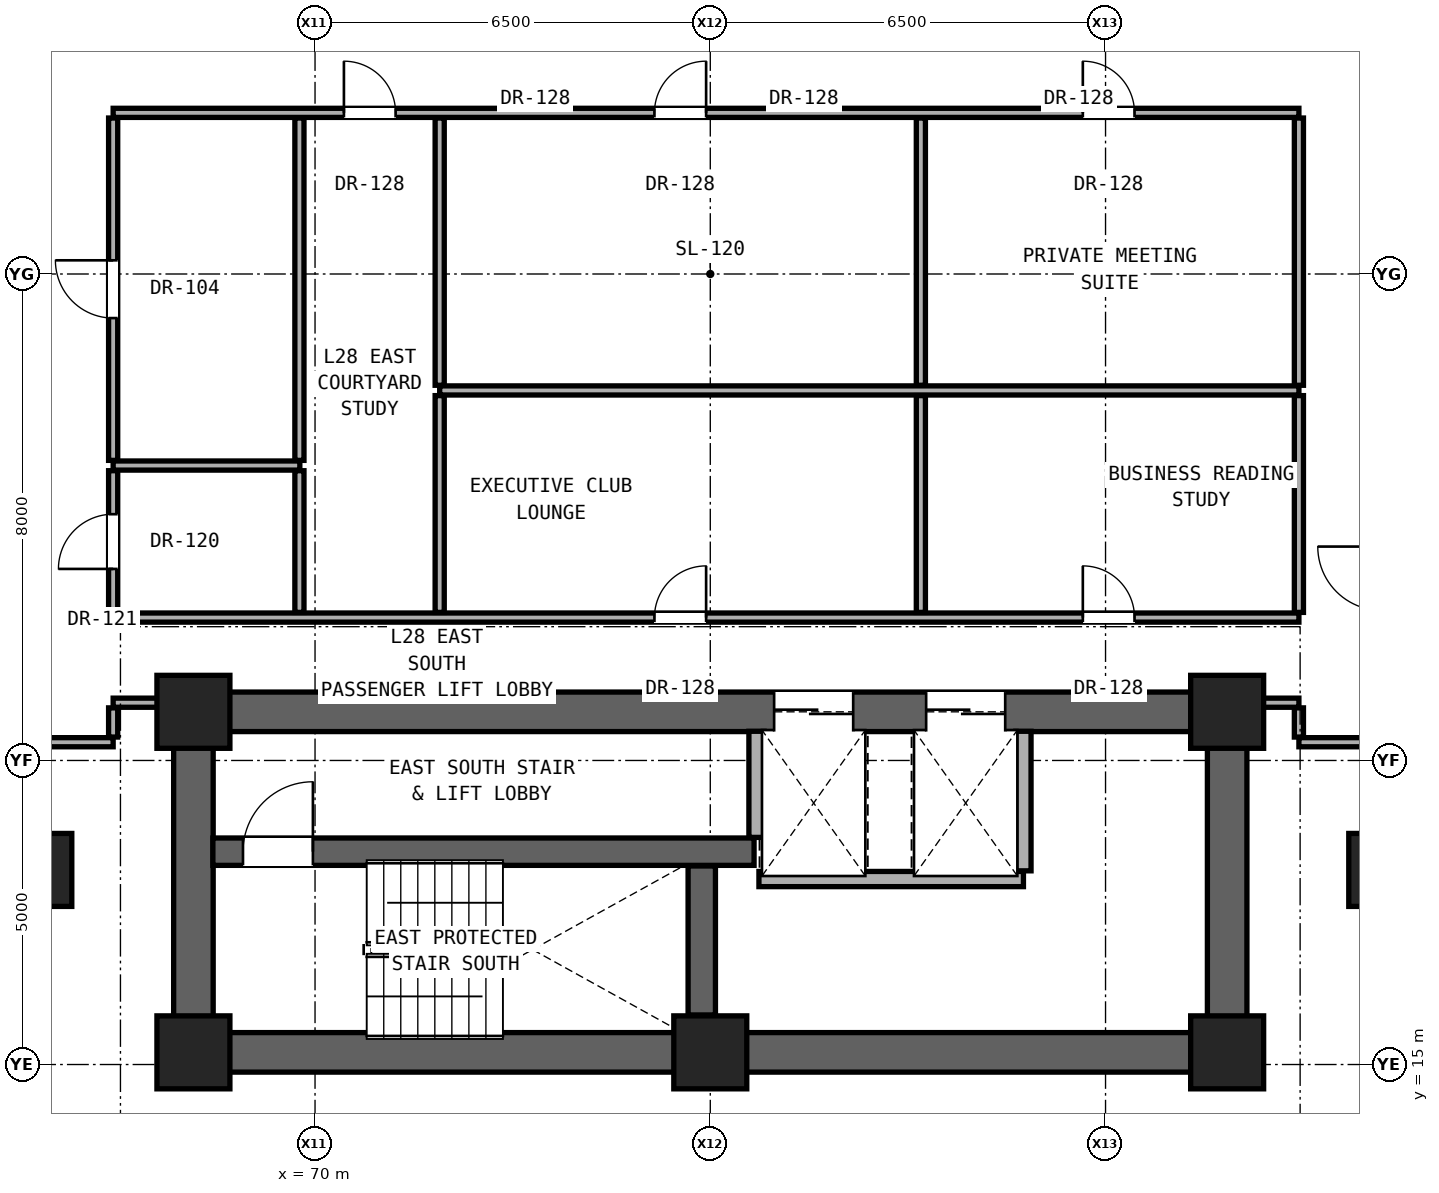
"""IFC4 building model, lengths in metres.
Left out: names, types, materials, properties, quantities, classifications, styles, units other than length and angle.
Written with IfcOpenShell. Run it as: python <this file> out.ifc"""

import sys

from ifc_helpers import new_model, si_unit, direction, frame, frame_2d, origin, origin_2d, place, context, subcontext, project, spatial, rectangle, extrude, element, fill, save


model = new_model("IFC4")
c1 = context("Model", 3, precision=1e-05, world=origin(), true_north=direction((0.0, 1.0)))
c2 = subcontext(c1, "Body", "Model", "MODEL_VIEW")
j1 = project(units=[si_unit("LENGTHUNIT", "METRE"), si_unit("PLANEANGLEUNIT", "RADIAN")], contexts=[c1])
p1 = place(None, origin())
s1 = spatial("IfcSite", under=j1, at=p1, CompositionType="ELEMENT")
p2 = place(p1, origin())
s2 = spatial("IfcBuilding", under=s1, at=p2, CompositionType="ELEMENT")
p3 = place(p2, frame((0.0, 0.0, 101.6)))
s3 = spatial("IfcBuildingStorey", under=s2, at=p3, CompositionType="ELEMENT", Elevation=101.6)
for number, where, z_axis, x_axis in (
    (1, (68.0, 15.2, 0.0), (0.0, 0.0, 1.0), (1.0, 0.0, 0.0)),
    (2, (76.5, 15.2, 0.0), (0.0, 0.0, 1.0), (1.0, 0.0, 0.0)),
    (3, (85.0, 15.2, 0.0), (0.0, 0.0, 1.0), (1.0, 0.0, 0.0)),
    (4, (68.0, 20.8, 0.0), (0.0, 0.0, 1.0), (1.0, 0.0, 0.0)),
    (5, (85.0, 20.8, 0.0), (0.0, 0.0, 1.0), (1.0, 0.0, 0.0)),
):
    element("IfcColumn", number, at=place(p3, frame(where, z_axis=z_axis, x_axis=x_axis)), inside=s3, PredefinedType="COLUMN", context=c2, shape_type="SweptSolid", body=[
        extrude(rectangle(XDim=1.2, YDim=1.2, at=origin_2d()), origin(), (0.0, 0.0, 1.0), 3.3),
    ])
for number, where, z_axis, x_axis in (
    (6, (65.6, 18.2, 0.0), (0.0, 0.0, 1.0), (1.0, 0.0, 0.0)),
    (7, (87.4, 18.2, 0.0), (0.0, 0.0, 1.0), (1.0, 0.0, 0.0)),
):
    element("IfcColumn", number, at=place(p3, frame(where, z_axis=z_axis, x_axis=x_axis)), inside=s3, PredefinedType="PILASTER", context=c2, shape_type="SweptSolid", body=[
        extrude(rectangle(XDim=0.8, YDim=1.2, at=origin_2d()), origin(), (0.0, 0.0, 1.0), 3.3),
    ])
p4 = place(p3, frame((68.0, 15.2, 0.0), z_axis=(0.0, 0.0, 1.0), x_axis=(1.0, 0.0, 0.0)))
e8 = element("IfcWall", 8, at=p4, inside=s3, PredefinedType="SHEAR", context=c2, shape_type="SweptSolid", body=[
    extrude(rectangle(XDim=17.0, YDim=0.65, at=frame_2d((8.5, 0.0))), origin(), (0.0, 0.0, 1.0), 3.08),
])
for number, where, z_axis, x_axis in (
    (9, (68.0, 15.2, 0.0), (0.0, 0.0, 1.0), (0.0, 1.0, 0.0)),
    (10, (85.0, 15.2, 0.0), (0.0, 0.0, 1.0), (0.0, 1.0, 0.0)),
):
    element("IfcWall", number, at=place(p3, frame(where, z_axis=z_axis, x_axis=x_axis)), inside=s3, PredefinedType="SHEAR", context=c2, shape_type="SweptSolid", body=[
        extrude(rectangle(XDim=5.6, YDim=0.65, at=frame_2d((2.8, 0.0))), origin(), (0.0, 0.0, 1.0), 3.08),
    ])
p5 = place(p3, frame((68.0, 20.8, 0.0), z_axis=(0.0, 0.0, 1.0), x_axis=(1.0, 0.0, 0.0)))
e11 = element("IfcWall", 11, at=p5, inside=s3, PredefinedType="SHEAR", context=c2, shape_type="SweptSolid", body=[
    extrude(rectangle(XDim=17.0, YDim=0.65, at=frame_2d((8.5, 0.0))), origin(), (0.0, 0.0, 1.0), 3.08),
])
p6 = place(p5, frame((9.55, 0.0, 0.0)))
e12 = element("IfcOpeningElement", 12, at=p6, cuts=e11, PredefinedType="OPENING", context=c2, shape_type="SweptSolid", body=[
    extrude(rectangle(XDim=1.3, YDim=2.3, at=frame_2d((0.65, 1.15))), frame((0.0, 0.335, 0.0), z_axis=(0.0, -1.0, 0.0), x_axis=(1.0, 0.0, 0.0)), (0.0, 0.0, 1.0), 0.67),
])
p7 = place(p5, frame((12.05, 0.0, 0.0)))
e13 = element("IfcOpeningElement", 13, at=p7, cuts=e11, PredefinedType="OPENING", context=c2, shape_type="SweptSolid", body=[
    extrude(rectangle(XDim=1.3, YDim=2.3, at=frame_2d((0.65, 1.15))), frame((0.0, 0.335, 0.0), z_axis=(0.0, -1.0, 0.0), x_axis=(1.0, 0.0, 0.0)), (0.0, 0.0, 1.0), 0.67),
])
p8 = place(p3, frame((77.3, 18.05, 0.0), z_axis=(0.0, 0.0, 1.0), x_axis=(1.0, 0.0, 0.0)))
e14 = element("IfcWall", 14, at=p8, inside=s3, PredefinedType="SOLIDWALL", context=c2, shape_type="SweptSolid", body=[
    extrude(rectangle(XDim=4.35, YDim=0.25, at=frame_2d((2.175, 0.0))), origin(), (0.0, 0.0, 1.0), 3.08),
])
p9 = place(p3, frame((68.32, 18.5, 0.0), z_axis=(0.0, 0.0, 1.0), x_axis=(1.0, 0.0, 0.0)))
e15 = element("IfcWall", 15, at=p9, inside=s3, PredefinedType="SHEAR", context=c2, shape_type="SweptSolid", body=[
    extrude(rectangle(XDim=8.9, YDim=0.45, at=frame_2d((4.45, 0.0))), origin(), (0.0, 0.0, 1.0), 3.08),
])
p10 = place(p9, frame((0.495, 0.0, 0.0)))
e16 = element("IfcOpeningElement", 16, at=p10, cuts=e15, PredefinedType="OPENING", context=c2, shape_type="SweptSolid", body=[
    extrude(rectangle(XDim=1.15, YDim=2.2, at=frame_2d((0.575, 1.1))), frame((0.0, 0.235, 0.0), z_axis=(0.0, -1.0, 0.0), x_axis=(1.0, 0.0, 0.0)), (0.0, 0.0, 1.0), 0.47),
])
p11 = place(p3, frame((65.32, 20.3, 0.0), z_axis=(0.0, 0.0, 1.0), x_axis=(1.0, 0.0, 0.0)))
e17 = element("IfcWall", 17, at=p11, inside=s3, PredefinedType="PARTITIONING", context=c2, shape_type="SweptSolid", body=[
    extrude(rectangle(XDim=1.36, YDim=0.15, at=frame_2d((0.68, 0.0))), origin(), (0.0, 0.0, 1.0), 3.08),
])
p12 = place(p3, frame((86.18, 20.3, 0.0), z_axis=(0.0, 0.0, 1.0), x_axis=(1.0, 0.0, 0.0)))
e18 = element("IfcWall", 18, at=p12, inside=s3, PredefinedType="PARTITIONING", context=c2, shape_type="SweptSolid", body=[
    extrude(rectangle(XDim=1.36, YDim=0.15, at=frame_2d((0.68, 0.0))), origin(), (0.0, 0.0, 1.0), 3.08),
])
p13 = place(p3, frame((66.68, 20.95, 0.0), z_axis=(0.0, 0.0, 1.0), x_axis=(1.0, 0.0, 0.0)))
e19 = element("IfcWall", 19, at=p13, inside=s3, PredefinedType="PARTITIONING", context=c2, shape_type="SweptSolid", body=[
    extrude(rectangle(XDim=1.0, YDim=0.15, at=frame_2d((0.5, 0.0))), origin(), (0.0, 0.0, 1.0), 2.472),
])
p14 = place(p3, frame((85.32, 20.95, 0.0), z_axis=(0.0, 0.0, 1.0), x_axis=(1.0, 0.0, 0.0)))
e20 = element("IfcWall", 20, at=p14, inside=s3, PredefinedType="PARTITIONING", context=c2, shape_type="SweptSolid", body=[
    extrude(rectangle(XDim=0.86, YDim=0.15, at=frame_2d((0.43, 0.0))), origin(), (0.0, 0.0, 1.0), 2.472),
])
p15 = place(p3, frame((66.68, 22.35, 0.0), z_axis=(0.0, 0.0, 1.0), x_axis=(1.0, 0.0, 0.0)))
e21 = element("IfcWall", 21, at=p15, inside=s3, PredefinedType="PARTITIONING", context=c2, shape_type="SweptSolid", body=[
    extrude(rectangle(XDim=19.5, YDim=0.15, at=frame_2d((9.75, 0.0))), origin(), (0.0, 0.0, 1.0), 2.145),
])
p16 = place(p15, frame((8.902, 0.0, 0.0)))
e22 = element("IfcOpeningElement", 22, at=p16, cuts=e21, PredefinedType="OPENING", context=c2, shape_type="SweptSolid", body=[
    extrude(rectangle(XDim=0.85, YDim=2.01, at=frame_2d((0.425, 1.005))), frame((0.0, 0.085, 0.0), z_axis=(0.0, -1.0, 0.0), x_axis=(1.0, 0.0, 0.0)), (0.0, 0.0, 1.0), 0.17),
])
p17 = place(p15, frame((15.947, 0.0, 0.0)))
e23 = element("IfcOpeningElement", 23, at=p17, cuts=e21, PredefinedType="OPENING", context=c2, shape_type="SweptSolid", body=[
    extrude(rectangle(XDim=0.85, YDim=2.01, at=frame_2d((0.425, 1.005))), frame((0.0, 0.085, 0.0), z_axis=(0.0, -1.0, 0.0), x_axis=(1.0, 0.0, 0.0)), (0.0, 0.0, 1.0), 0.17),
])
p18 = place(p3, frame((66.68, 24.85, 0.0), z_axis=(0.0, 0.0, 1.0), x_axis=(1.0, 0.0, 0.0)))
e24 = element("IfcWall", 24, at=p18, inside=s3, PredefinedType="PARTITIONING", context=c2, shape_type="SweptSolid", body=[
    extrude(rectangle(XDim=3.07, YDim=0.15, at=frame_2d((1.535, 0.0))), origin(), (0.0, 0.0, 1.0), 2.145),
])
p19 = place(p3, frame((72.05, 26.085, 0.0), z_axis=(0.0, 0.0, 1.0), x_axis=(1.0, 0.0, 0.0)))
e25 = element("IfcWall", 25, at=p19, inside=s3, PredefinedType="PARTITIONING", context=c2, shape_type="SweptSolid", body=[
    extrude(rectangle(XDim=14.13, YDim=0.15, at=frame_2d((7.065, 0.0))), origin(), (0.0, 0.0, 1.0), 2.145),
])
p20 = place(p3, frame((66.68, 30.65, 0.0), z_axis=(0.0, 0.0, 1.0), x_axis=(1.0, 0.0, 0.0)))
e26 = element("IfcWall", 26, at=p20, inside=s3, PredefinedType="PARTITIONING", context=c2, shape_type="SweptSolid", body=[
    extrude(rectangle(XDim=19.5, YDim=0.15, at=frame_2d((9.75, 0.0))), origin(), (0.0, 0.0, 1.0), 2.145),
])
p21 = place(p20, frame((3.795, 0.0, 0.0)))
e27 = element("IfcOpeningElement", 27, at=p21, cuts=e26, PredefinedType="OPENING", context=c2, shape_type="SweptSolid", body=[
    extrude(rectangle(XDim=0.85, YDim=2.01, at=frame_2d((0.425, 1.005))), frame((0.0, 0.085, 0.0), z_axis=(0.0, -1.0, 0.0), x_axis=(1.0, 0.0, 0.0)), (0.0, 0.0, 1.0), 0.17),
])
p22 = place(p20, frame((8.902, 0.0, 0.0)))
e28 = element("IfcOpeningElement", 28, at=p22, cuts=e26, PredefinedType="OPENING", context=c2, shape_type="SweptSolid", body=[
    extrude(rectangle(XDim=0.85, YDim=2.01, at=frame_2d((0.425, 1.005))), frame((0.0, 0.085, 0.0), z_axis=(0.0, -1.0, 0.0), x_axis=(1.0, 0.0, 0.0)), (0.0, 0.0, 1.0), 0.17),
])
p23 = place(p20, frame((15.947, 0.0, 0.0)))
e29 = element("IfcOpeningElement", 29, at=p23, cuts=e26, PredefinedType="OPENING", context=c2, shape_type="SweptSolid", body=[
    extrude(rectangle(XDim=0.85, YDim=2.01, at=frame_2d((0.425, 1.005))), frame((0.0, 0.085, 0.0), z_axis=(0.0, -1.0, 0.0), x_axis=(1.0, 0.0, 0.0)), (0.0, 0.0, 1.0), 0.17),
])
p24 = place(p3, frame((66.68, 20.385, 0.0), z_axis=(0.0, 0.0, 1.0), x_axis=(0.0, 1.0, 0.0)))
e30 = element("IfcWall", 30, at=p24, inside=s3, PredefinedType="PARTITIONING", context=c2, shape_type="SweptSolid", body=[
    extrude(rectangle(XDim=0.48, YDim=0.15, at=frame_2d((0.24, 0.0))), origin(), (0.0, 0.0, 1.0), 2.472),
])
p25 = place(p3, frame((66.68, 22.435, 0.0), z_axis=(0.0, 0.0, 1.0), x_axis=(0.0, 1.0, 0.0)))
e31 = element("IfcWall", 31, at=p25, inside=s3, PredefinedType="PARTITIONING", context=c2, shape_type="SweptSolid", body=[
    extrude(rectangle(XDim=2.33, YDim=0.15, at=frame_2d((1.165, 0.0))), origin(), (0.0, 0.0, 1.0), 3.08),
])
p26 = place(p25, frame((0.715, 0.0, 0.0)))
e32 = element("IfcOpeningElement", 32, at=p26, cuts=e31, PredefinedType="OPENING", context=c2, shape_type="SweptSolid", body=[
    extrude(rectangle(XDim=0.9, YDim=2.1, at=frame_2d((0.45, 1.05))), frame((0.0, 0.085, 0.0), z_axis=(0.0, -1.0, 0.0), x_axis=(1.0, 0.0, 0.0)), (0.0, 0.0, 1.0), 0.17),
])
p27 = place(p3, frame((66.68, 24.935, 0.0), z_axis=(0.0, 0.0, 1.0), x_axis=(0.0, 1.0, 0.0)))
e33 = element("IfcWall", 33, at=p27, inside=s3, PredefinedType="PARTITIONING", context=c2, shape_type="SweptSolid", body=[
    extrude(rectangle(XDim=5.63, YDim=0.15, at=frame_2d((2.815, 0.0))), origin(), (0.0, 0.0, 1.0), 2.299),
])
p28 = place(p27, frame((2.34, 0.0, 0.0)))
e34 = element("IfcOpeningElement", 34, at=p28, cuts=e33, PredefinedType="OPENING", context=c2, shape_type="SweptSolid", body=[
    extrude(rectangle(XDim=0.95, YDim=2.15, at=frame_2d((0.475, 1.075))), frame((0.0, 0.085, 0.0), z_axis=(0.0, -1.0, 0.0), x_axis=(1.0, 0.0, 0.0)), (0.0, 0.0, 1.0), 0.17),
])
p29 = place(p3, frame((69.743, 22.435, 0.0), z_axis=(0.0, 0.0, 1.0), x_axis=(0.0, 1.0, 0.0)))
e35 = element("IfcWall", 35, at=p29, inside=s3, PredefinedType="PARTITIONING", context=c2, shape_type="SweptSolid", body=[
    extrude(rectangle(XDim=2.33, YDim=0.15, at=frame_2d((1.165, 0.0))), origin(), (0.0, 0.0, 1.0), 3.08),
])
p30 = place(p3, frame((69.743, 24.935, 0.0), z_axis=(0.0, 0.0, 1.0), x_axis=(0.0, 1.0, 0.0)))
e36 = element("IfcWall", 36, at=p30, inside=s3, PredefinedType="PARTITIONING", context=c2, shape_type="SweptSolid", body=[
    extrude(rectangle(XDim=5.63, YDim=0.15, at=frame_2d((2.815, 0.0))), origin(), (0.0, 0.0, 1.0), 2.145),
])
p31 = place(p3, frame((72.05, 22.435, 0.0), z_axis=(0.0, 0.0, 1.0), x_axis=(0.0, 1.0, 0.0)))
e37 = element("IfcWall", 37, at=p31, inside=s3, PredefinedType="PARTITIONING", context=c2, shape_type="SweptSolid", body=[
    extrude(rectangle(XDim=3.565, YDim=0.15, at=frame_2d((1.782, 0.0))), origin(), (0.0, 0.0, 1.0), 2.609),
])
p32 = place(p3, frame((72.05, 26.17, 0.0), z_axis=(0.0, 0.0, 1.0), x_axis=(0.0, 1.0, 0.0)))
e38 = element("IfcWall", 38, at=p32, inside=s3, PredefinedType="PARTITIONING", context=c2, shape_type="SweptSolid", body=[
    extrude(rectangle(XDim=4.395, YDim=0.15, at=frame_2d((2.198, 0.0))), origin(), (0.0, 0.0, 1.0), 2.145),
])
p33 = place(p3, frame((76.36, 15.815, 0.0), z_axis=(0.0, 0.0, 1.0), x_axis=(0.0, 1.0, 0.0)))
e39 = element("IfcWall", 39, at=p33, inside=s3, PredefinedType="SHEAR", context=c2, shape_type="SweptSolid", body=[
    extrude(rectangle(XDim=2.45, YDim=0.45, at=frame_2d((1.225, 0.0))), origin(), (0.0, 0.0, 1.0), 3.08),
])
p34 = place(p3, frame((77.26, 18.735, 0.0), z_axis=(0.0, 0.0, 1.0), x_axis=(0.0, 1.0, 0.0)))
e40 = element("IfcWall", 40, at=p34, inside=s3, PredefinedType="SOLIDWALL", context=c2, shape_type="SweptSolid", body=[
    extrude(rectangle(XDim=1.745, YDim=0.25, at=frame_2d((0.873, 0.0))), origin(), (0.0, 0.0, 1.0), 3.08),
])
p35 = place(p3, frame((79.963, 22.435, 0.0), z_axis=(0.0, 0.0, 1.0), x_axis=(0.0, 1.0, 0.0)))
e41 = element("IfcWall", 41, at=p35, inside=s3, PredefinedType="PARTITIONING", context=c2, shape_type="SweptSolid", body=[
    extrude(rectangle(XDim=3.565, YDim=0.15, at=frame_2d((1.782, 0.0))), origin(), (0.0, 0.0, 1.0), 3.08),
])
p36 = place(p3, frame((79.963, 26.17, 0.0), z_axis=(0.0, 0.0, 1.0), x_axis=(0.0, 1.0, 0.0)))
e42 = element("IfcWall", 42, at=p36, inside=s3, PredefinedType="PARTITIONING", context=c2, shape_type="SweptSolid", body=[
    extrude(rectangle(XDim=4.395, YDim=0.15, at=frame_2d((2.198, 0.0))), origin(), (0.0, 0.0, 1.0), 2.145),
])
p37 = place(p3, frame((81.65, 18.185, 0.0), z_axis=(0.0, 0.0, 1.0), x_axis=(0.0, 1.0, 0.0)))
e43 = element("IfcWall", 43, at=p37, inside=s3, PredefinedType="SOLIDWALL", context=c2, shape_type="SweptSolid", body=[
    extrude(rectangle(XDim=2.295, YDim=0.25, at=frame_2d((1.147, 0.0))), origin(), (0.0, 0.0, 1.0), 3.08),
])
p38 = place(p3, frame((86.18, 20.385, 0.0), z_axis=(0.0, 0.0, 1.0), x_axis=(0.0, 1.0, 0.0)))
e44 = element("IfcWall", 44, at=p38, inside=s3, PredefinedType="PARTITIONING", context=c2, shape_type="SweptSolid", body=[
    extrude(rectangle(XDim=0.48, YDim=0.15, at=frame_2d((0.24, 0.0))), origin(), (0.0, 0.0, 1.0), 2.472),
])
p39 = place(p3, frame((86.18, 22.435, 0.0), z_axis=(0.0, 0.0, 1.0), x_axis=(0.0, 1.0, 0.0)))
e45 = element("IfcWall", 45, at=p39, inside=s3, PredefinedType="PARTITIONING", context=c2, shape_type="SweptSolid", body=[
    extrude(rectangle(XDim=3.565, YDim=0.15, at=frame_2d((1.782, 0.0))), origin(), (0.0, 0.0, 1.0), 3.08),
])
p40 = place(p3, frame((86.18, 26.17, 0.0), z_axis=(0.0, 0.0, 1.0), x_axis=(0.0, 1.0, 0.0)))
e46 = element("IfcWall", 46, at=p40, inside=s3, PredefinedType="PARTITIONING", context=c2, shape_type="SweptSolid", body=[
    extrude(rectangle(XDim=4.395, YDim=0.15, at=frame_2d((2.198, 0.0))), origin(), (0.0, 0.0, 1.0), 2.299),
])
p41 = place(p10, origin())
e47 = element("IfcDoor", 47, at=p41, inside=s3, OperationType="SINGLE_SWING_RIGHT", PredefinedType="DOOR", context=c2, shape_type="SweptSolid", body=[
    extrude(rectangle(XDim=1.15, YDim=2.2, at=frame_2d((0.575, 1.1))), frame((0.0, 0.025, 0.0), z_axis=(0.0, -1.0, 0.0), x_axis=(1.0, 0.0, 0.0)), (0.0, 0.0, 1.0), 0.05),
])
fill(e16, e47)
p42 = place(p26, origin())
e48 = element("IfcDoor", 48, at=p42, inside=s3, OperationType="SINGLE_SWING_LEFT", PredefinedType="DOOR", context=c2, shape_type="SweptSolid", body=[
    extrude(rectangle(XDim=0.9, YDim=2.1, at=frame_2d((0.45, 1.05))), frame((0.0, 0.025, 0.0), z_axis=(0.0, -1.0, 0.0), x_axis=(1.0, 0.0, 0.0)), (0.0, 0.0, 1.0), 0.05),
])
fill(e32, e48)
p43 = place(p28, origin())
e49 = element("IfcDoor", 49, at=p43, inside=s3, OperationType="SINGLE_SWING_RIGHT", PredefinedType="DOOR", context=c2, shape_type="SweptSolid", body=[
    extrude(rectangle(XDim=0.95, YDim=2.15, at=frame_2d((0.475, 1.075))), frame((0.0, 0.025, 0.0), z_axis=(0.0, -1.0, 0.0), x_axis=(1.0, 0.0, 0.0)), (0.0, 0.0, 1.0), 0.05),
])
fill(e34, e49)
p44 = place(p21, origin())
e50 = element("IfcDoor", 50, at=p44, inside=s3, OperationType="SINGLE_SWING_LEFT", PredefinedType="DOOR", context=c2, shape_type="SweptSolid", body=[
    extrude(rectangle(XDim=0.85, YDim=2.01, at=frame_2d((0.425, 1.005))), frame((0.0, 0.025, 0.0), z_axis=(0.0, -1.0, 0.0), x_axis=(1.0, 0.0, 0.0)), (0.0, 0.0, 1.0), 0.05),
])
fill(e27, e50)
p45 = place(p16, origin())
e51 = element("IfcDoor", 51, at=p45, inside=s3, OperationType="SINGLE_SWING_RIGHT", PredefinedType="DOOR", context=c2, shape_type="SweptSolid", body=[
    extrude(rectangle(XDim=0.85, YDim=2.01, at=frame_2d((0.425, 1.005))), frame((0.0, 0.025, 0.0), z_axis=(0.0, -1.0, 0.0), x_axis=(1.0, 0.0, 0.0)), (0.0, 0.0, 1.0), 0.05),
])
fill(e22, e51)
p46 = place(p17, origin())
e52 = element("IfcDoor", 52, at=p46, inside=s3, OperationType="SINGLE_SWING_LEFT", PredefinedType="DOOR", context=c2, shape_type="SweptSolid", body=[
    extrude(rectangle(XDim=0.85, YDim=2.01, at=frame_2d((0.425, 1.005))), frame((0.0, 0.025, 0.0), z_axis=(0.0, -1.0, 0.0), x_axis=(1.0, 0.0, 0.0)), (0.0, 0.0, 1.0), 0.05),
])
fill(e23, e52)
p47 = place(p22, origin())
e53 = element("IfcDoor", 53, at=p47, inside=s3, OperationType="SINGLE_SWING_RIGHT", PredefinedType="DOOR", context=c2, shape_type="SweptSolid", body=[
    extrude(rectangle(XDim=0.85, YDim=2.01, at=frame_2d((0.425, 1.005))), frame((0.0, 0.025, 0.0), z_axis=(0.0, -1.0, 0.0), x_axis=(1.0, 0.0, 0.0)), (0.0, 0.0, 1.0), 0.05),
])
fill(e28, e53)
p48 = place(p23, origin())
e54 = element("IfcDoor", 54, at=p48, inside=s3, OperationType="SINGLE_SWING_LEFT", PredefinedType="DOOR", context=c2, shape_type="SweptSolid", body=[
    extrude(rectangle(XDim=0.85, YDim=2.01, at=frame_2d((0.425, 1.005))), frame((0.0, 0.025, 0.0), z_axis=(0.0, -1.0, 0.0), x_axis=(1.0, 0.0, 0.0)), (0.0, 0.0, 1.0), 0.05),
])
fill(e29, e54)
p49 = place(p6, origin())
e55 = element("IfcDoor", 55, at=p49, inside=s3, OperationType="DOUBLE_DOOR_SLIDING", PredefinedType="DOOR", context=c2, shape_type="SweptSolid", body=[
    extrude(rectangle(XDim=1.3, YDim=2.3, at=frame_2d((0.65, 1.15))), frame((0.0, 0.025, 0.0), z_axis=(0.0, -1.0, 0.0), x_axis=(1.0, 0.0, 0.0)), (0.0, 0.0, 1.0), 0.05),
])
fill(e12, e55)
p50 = place(p7, origin())
e56 = element("IfcDoor", 56, at=p50, inside=s3, OperationType="DOUBLE_DOOR_SLIDING", PredefinedType="DOOR", context=c2, shape_type="SweptSolid", body=[
    extrude(rectangle(XDim=1.3, YDim=2.3, at=frame_2d((0.65, 1.15))), frame((0.0, 0.025, 0.0), z_axis=(0.0, -1.0, 0.0), x_axis=(1.0, 0.0, 0.0)), (0.0, 0.0, 1.0), 0.05),
])
fill(e13, e56)
save(model, sys.argv[1])
